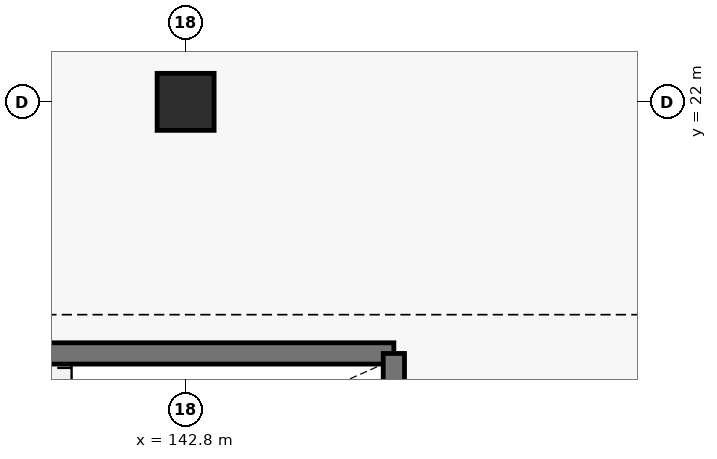
"""IFC4 building model, lengths in metres.
Left out: names, types, materials, properties, quantities, classifications, styles, units other than length and angle.
Written with IfcOpenShell. Run it as: python <this file> out.ifc"""

import sys

from ifc_helpers import new_model, si_unit, direction, frame, frame_2d, origin, origin_2d, place, context, subcontext, project, spatial, rectangle, extrude, element, save


model = new_model("IFC4")
c1 = context("Model", 3, precision=1e-05, world=origin(), true_north=direction((0.0, 1.0)))
c2 = subcontext(c1, "Body", "Model", "MODEL_VIEW")
j1 = project(units=[si_unit("LENGTHUNIT", "METRE"), si_unit("PLANEANGLEUNIT", "RADIAN")], contexts=[c1])
p1 = place(None, origin())
s1 = spatial("IfcSite", under=j1, at=p1, CompositionType="ELEMENT")
p2 = place(p1, origin())
s2 = spatial("IfcBuilding", under=s1, at=p2, CompositionType="ELEMENT")
p3 = place(p2, frame((0.0, 0.0, 9.6)))
s3 = spatial("IfcBuildingStorey", under=s2, at=p3, CompositionType="ELEMENT", Elevation=9.6)
p4 = place(p3, frame((142.8, 22.0, 0.0), z_axis=(0.0, 0.0, 1.0), x_axis=(1.0, 0.0, 0.0)))
e1 = element("IfcColumn", 1, at=p4, inside=s3, PredefinedType="COLUMN", context=c2, shape_type="SweptSolid", body=[
    extrude(rectangle(XDim=0.75, YDim=0.75, at=origin_2d()), origin(), (0.0, 0.0, 1.0), 3.52),
])
p5 = place(p3, frame((136.66, 18.69, 0.0), z_axis=(0.0, 0.0, 1.0), x_axis=(1.0, 0.0, 0.0)))
e2 = element("IfcWall", 2, at=p5, inside=s3, PredefinedType="SHEAR", context=c2, shape_type="SweptSolid", body=[
    extrude(rectangle(XDim=8.88, YDim=0.28, at=frame_2d((4.44, 0.0))), origin(), (0.0, 0.0, 1.0), 3.52),
])
p6 = place(p3, frame((145.54, 15.26, 0.0), z_axis=(0.0, 0.0, 1.0), x_axis=(0.0, 1.0, 0.0)))
e3 = element("IfcWall", 3, at=p6, inside=s3, PredefinedType="SHEAR", context=c2, shape_type="SweptSolid", body=[
    extrude(rectangle(XDim=3.43, YDim=0.28, at=frame_2d((1.715, 0.0))), origin(), (0.0, 0.0, 1.0), 3.52),
])
save(model, sys.argv[1])
